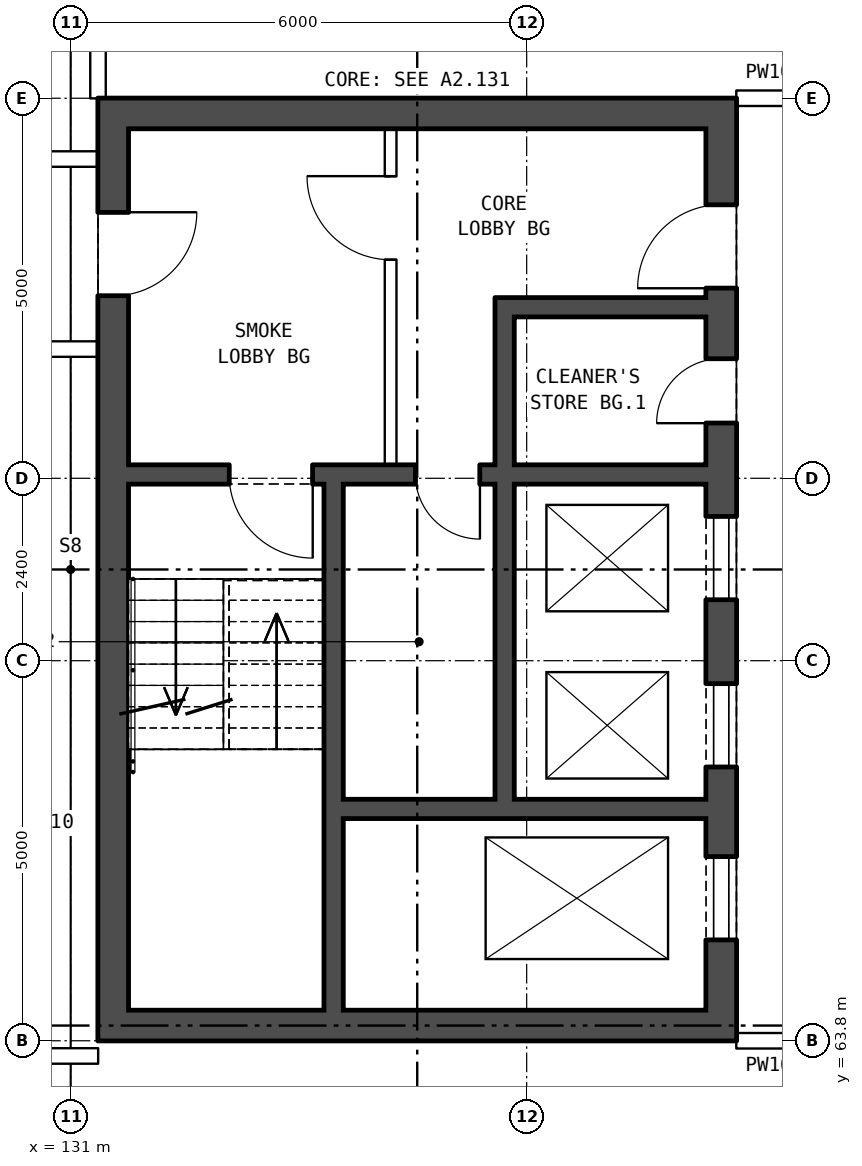
"""IFC4 building model, lengths in metres.
Left out: names, types, materials, properties, quantities, classifications, styles, units other than length and angle.
Written with IfcOpenShell. Run it as: python <this file> out.ifc"""

import sys

from ifc_helpers import new_model, si_unit, direction, frame, frame_2d, origin, place, context, subcontext, project, spatial, rectangle, extrude, element, fill, save


model = new_model("IFC4")
c1 = context("Model", 3, precision=1e-05, world=origin(), true_north=direction((0.0, 1.0)))
c2 = subcontext(c1, "Body", "Model", "MODEL_VIEW")
j1 = project(units=[si_unit("LENGTHUNIT", "METRE"), si_unit("PLANEANGLEUNIT", "RADIAN")], contexts=[c1])
p1 = place(None, origin())
s1 = spatial("IfcSite", under=j1, at=p1, CompositionType="ELEMENT")
p2 = place(p1, origin())
s2 = spatial("IfcBuilding", under=s1, at=p2, CompositionType="ELEMENT")
p3 = place(p2, frame((0.0, 0.0, 215.2)))
s3 = spatial("IfcBuildingStorey", under=s2, at=p3, CompositionType="ELEMENT", Elevation=215.2)
p4 = place(p3, frame((139.56, 63.8, 0.0), z_axis=(0.0, 0.0, 1.0), x_axis=(0.0, 1.0, 0.0)))
e1 = element("IfcWall", 1, at=p4, inside=s3, PredefinedType="SHEAR", context=c2, shape_type="SweptSolid", body=[
    extrude(rectangle(XDim=12.4, YDim=0.4, at=frame_2d((6.2, 0.0))), origin(), (0.0, 0.0, 1.0), 5.6),
])
p5 = place(p4, frame((1.325, 0.0, 0.0)))
e2 = element("IfcOpeningElement", 2, at=p5, cuts=e1, PredefinedType="OPENING", context=c2, shape_type="SweptSolid", body=[
    extrude(rectangle(XDim=1.1, YDim=2.1, at=frame_2d((0.55, 1.05))), frame((0.0, 0.21, 0.0), z_axis=(0.0, -1.0, 0.0), x_axis=(1.0, 0.0, 0.0)), (0.0, 0.0, 1.0), 0.42),
])
p6 = place(p4, frame((3.6, 0.0, 0.0)))
e3 = element("IfcOpeningElement", 3, at=p6, cuts=e1, PredefinedType="OPENING", context=c2, shape_type="SweptSolid", body=[
    extrude(rectangle(XDim=1.1, YDim=2.1, at=frame_2d((0.55, 1.05))), frame((0.0, 0.21, 0.0), z_axis=(0.0, -1.0, 0.0), x_axis=(1.0, 0.0, 0.0)), (0.0, 0.0, 1.0), 0.42),
])
p7 = place(p4, frame((5.8, 0.0, 0.0)))
e4 = element("IfcOpeningElement", 4, at=p7, cuts=e1, PredefinedType="OPENING", context=c2, shape_type="SweptSolid", body=[
    extrude(rectangle(XDim=1.1, YDim=2.1, at=frame_2d((0.55, 1.05))), frame((0.0, 0.21, 0.0), z_axis=(0.0, -1.0, 0.0), x_axis=(1.0, 0.0, 0.0)), (0.0, 0.0, 1.0), 0.42),
])
p8 = place(p4, frame((9.9, 0.0, 0.0)))
e5 = element("IfcOpeningElement", 5, at=p8, cuts=e1, PredefinedType="OPENING", context=c2, shape_type="SweptSolid", body=[
    extrude(rectangle(XDim=1.1, YDim=2.1, at=frame_2d((0.55, 1.05))), frame((0.0, 0.21, 0.0), z_axis=(0.0, -1.0, 0.0), x_axis=(1.0, 0.0, 0.0)), (0.0, 0.0, 1.0), 0.42),
])
p9 = place(p4, frame((8.125, 0.0, 0.0)))
e6 = element("IfcOpeningElement", 6, at=p9, cuts=e1, PredefinedType="OPENING", context=c2, shape_type="SweptSolid", body=[
    extrude(rectangle(XDim=0.85, YDim=2.1, at=frame_2d((0.425, 1.05))), frame((0.0, 0.21, 0.0), z_axis=(0.0, -1.0, 0.0), x_axis=(1.0, 0.0, 0.0)), (0.0, 0.0, 1.0), 0.42),
])
p10 = place(p3, frame((131.56, 63.8, 0.0), z_axis=(0.0, 0.0, 1.0), x_axis=(0.0, 1.0, 0.0)))
e7 = element("IfcWall", 7, at=p10, inside=s3, PredefinedType="SHEAR", context=c2, shape_type="SweptSolid", body=[
    extrude(rectangle(XDim=12.4, YDim=0.4, at=frame_2d((6.2, 0.0))), origin(), (0.0, 0.0, 1.0), 5.6),
])
p11 = place(p10, frame((9.8, 0.0, 0.0)))
e8 = element("IfcOpeningElement", 8, at=p11, cuts=e7, PredefinedType="OPENING", context=c2, shape_type="SweptSolid", body=[
    extrude(rectangle(XDim=1.1, YDim=2.1, at=frame_2d((0.55, 1.05))), frame((0.0, 0.21, 0.0), z_axis=(0.0, -1.0, 0.0), x_axis=(1.0, 0.0, 0.0)), (0.0, 0.0, 1.0), 0.42),
])
for number, where, z_axis, x_axis in (
    (9, (139.36, 64.0, 0.0), (0.0, 0.0, 1.0), (-1.0, 0.0, 0.0)),
    (10, (139.36, 76.0, 0.0), (0.0, 0.0, 1.0), (-1.0, 0.0, 0.0)),
):
    element("IfcWall", number, at=place(p3, frame(where, z_axis=z_axis, x_axis=x_axis)), inside=s3, PredefinedType="SHEAR", context=c2, shape_type="SweptSolid", body=[
        extrude(rectangle(XDim=7.6, YDim=0.4, at=frame_2d((3.8, 0.0))), origin(), (0.0, 0.0, 1.0), 5.6),
    ])
p12 = place(p3, frame((139.36, 66.85, 0.0), z_axis=(0.0, 0.0, 1.0), x_axis=(-1.0, 0.0, 0.0)))
e11 = element("IfcWall", 11, at=p12, inside=s3, PredefinedType="SHEAR", context=c2, shape_type="SweptSolid", body=[
    extrude(rectangle(XDim=4.775, YDim=0.25, at=frame_2d((2.388, 0.0))), origin(), (0.0, 0.0, 1.0), 5.6),
])
p13 = place(p3, frame((139.36, 71.25, 0.0), z_axis=(0.0, 0.0, 1.0), x_axis=(-1.0, 0.0, 0.0)))
e12 = element("IfcWall", 12, at=p13, inside=s3, PredefinedType="SHEAR", context=c2, shape_type="SweptSolid", body=[
    extrude(rectangle(XDim=7.6, YDim=0.25, at=frame_2d((3.8, 0.0))), origin(), (0.0, 0.0, 1.0), 5.6),
])
p14 = place(p13, frame((5.175, 0.0, 0.0)))
e13 = element("IfcOpeningElement", 13, at=p14, cuts=e12, PredefinedType="OPENING", context=c2, shape_type="SweptSolid", body=[
    extrude(rectangle(XDim=1.1, YDim=2.1, at=frame_2d((0.55, 1.05))), frame((0.0, 0.135, 0.0), z_axis=(0.0, -1.0, 0.0), x_axis=(1.0, 0.0, 0.0)), (0.0, 0.0, 1.0), 0.27),
])
p15 = place(p13, frame((2.975, 0.0, 0.0)))
e14 = element("IfcOpeningElement", 14, at=p15, cuts=e12, PredefinedType="OPENING", context=c2, shape_type="SweptSolid", body=[
    extrude(rectangle(XDim=0.85, YDim=2.1, at=frame_2d((0.425, 1.05))), frame((0.0, 0.135, 0.0), z_axis=(0.0, -1.0, 0.0), x_axis=(1.0, 0.0, 0.0)), (0.0, 0.0, 1.0), 0.27),
])
p16 = place(p3, frame((139.36, 73.45, 0.0), z_axis=(0.0, 0.0, 1.0), x_axis=(-1.0, 0.0, 0.0)))
e15 = element("IfcWall", 15, at=p16, inside=s3, PredefinedType="SHEAR", context=c2, shape_type="SweptSolid", body=[
    extrude(rectangle(XDim=2.525, YDim=0.25, at=frame_2d((1.263, 0.0))), origin(), (0.0, 0.0, 1.0), 5.6),
])
p17 = place(p3, frame((136.71, 66.975, 0.0), z_axis=(0.0, 0.0, 1.0), x_axis=(0.0, 1.0, 0.0)))
e16 = element("IfcWall", 16, at=p17, inside=s3, PredefinedType="SHEAR", context=c2, shape_type="SweptSolid", body=[
    extrude(rectangle(XDim=4.15, YDim=0.25, at=frame_2d((2.075, 0.0))), origin(), (0.0, 0.0, 1.0), 5.6),
])
p18 = place(p3, frame((136.71, 71.375, 0.0), z_axis=(0.0, 0.0, 1.0), x_axis=(0.0, 1.0, 0.0)))
e17 = element("IfcWall", 17, at=p18, inside=s3, PredefinedType="SHEAR", context=c2, shape_type="SweptSolid", body=[
    extrude(rectangle(XDim=2.2, YDim=0.25, at=frame_2d((1.1, 0.0))), origin(), (0.0, 0.0, 1.0), 5.6),
])
p19 = place(p3, frame((135.21, 71.375, 0.0), z_axis=(0.0, 0.0, 1.0), x_axis=(0.0, 1.0, 0.0)))
e18 = element("IfcWall", 18, at=p19, inside=s3, PredefinedType="PARTITIONING", context=c2, shape_type="SweptSolid", body=[
    extrude(rectangle(XDim=4.425, YDim=0.15, at=frame_2d((2.212, 0.0))), origin(), (0.0, 0.0, 1.0), 5.6),
])
p20 = place(p19, frame((2.7, 0.0, 0.0)))
e19 = element("IfcOpeningElement", 19, at=p20, cuts=e18, PredefinedType="OPENING", context=c2, shape_type="SweptSolid", body=[
    extrude(rectangle(XDim=1.1, YDim=2.1, at=frame_2d((0.55, 1.05))), frame((0.0, 0.085, 0.0), z_axis=(0.0, -1.0, 0.0), x_axis=(1.0, 0.0, 0.0)), (0.0, 0.0, 1.0), 0.17),
])
p21 = place(p3, frame((134.46, 64.2, 0.0), z_axis=(0.0, 0.0, 1.0), x_axis=(0.0, 1.0, 0.0)))
e20 = element("IfcWall", 20, at=p21, inside=s3, PredefinedType="SHEAR", context=c2, shape_type="SweptSolid", body=[
    extrude(rectangle(XDim=6.925, YDim=0.25, at=frame_2d((3.462, 0.0))), origin(), (0.0, 0.0, 1.0), 5.6),
])
p22 = place(p3, frame((101.2, 63.6, 0.0), z_axis=(0.0, 0.0, 1.0), x_axis=(1.0, 0.0, 0.0)))
e21 = element("IfcWall", 21, at=p22, inside=s3, PredefinedType="PARTITIONING", context=c2, shape_type="SweptSolid", body=[
    extrude(rectangle(XDim=30.16, YDim=0.2, at=frame_2d((15.08, 0.0))), origin(), (0.0, 0.0, 1.0), 5.6),
])
p23 = place(p3, frame((139.76, 63.8, 0.0), z_axis=(0.0, 0.0, 1.0), x_axis=(1.0, 0.0, 0.0)))
e22 = element("IfcWall", 22, at=p23, inside=s3, PredefinedType="PARTITIONING", context=c2, shape_type="SweptSolid", body=[
    extrude(rectangle(XDim=3.0, YDim=0.2, at=frame_2d((1.5, 0.0))), origin(), (0.0, 0.0, 1.0), 5.6),
])
p24 = place(p23, frame((1.0, 0.0, 0.0)))
e23 = element("IfcOpeningElement", 23, at=p24, cuts=e22, PredefinedType="OPENING", context=c2, shape_type="SweptSolid", body=[
    extrude(rectangle(XDim=1.0, YDim=2.1, at=frame_2d((0.5, 1.05))), frame((0.0, 0.11, 0.0), z_axis=(0.0, -1.0, 0.0), x_axis=(1.0, 0.0, 0.0)), (0.0, 0.0, 1.0), 0.22),
])
p25 = place(p3, frame((101.2, 72.9, 0.0), z_axis=(0.0, 0.0, 1.0), x_axis=(1.0, 0.0, 0.0)))
e24 = element("IfcWall", 24, at=p25, inside=s3, PredefinedType="PARTITIONING", context=c2, shape_type="SweptSolid", body=[
    extrude(rectangle(XDim=30.16, YDim=0.2, at=frame_2d((15.08, 0.0))), origin(), (0.0, 0.0, 1.0), 5.6),
])
p26 = place(p25, frame((15.55, 0.0, 0.0)))
e25 = element("IfcOpeningElement", 25, at=p26, cuts=e24, PredefinedType="OPENING", context=c2, shape_type="SweptSolid", body=[
    extrude(rectangle(XDim=1.0, YDim=2.1, at=frame_2d((0.5, 1.05))), frame((0.0, 0.11, 0.0), z_axis=(0.0, -1.0, 0.0), x_axis=(1.0, 0.0, 0.0)), (0.0, 0.0, 1.0), 0.22),
])
p27 = place(p25, frame((25.643, 0.0, 0.0)))
e26 = element("IfcOpeningElement", 26, at=p27, cuts=e24, PredefinedType="OPENING", context=c2, shape_type="SweptSolid", body=[
    extrude(rectangle(XDim=1.8, YDim=2.1, at=frame_2d((0.9, 1.05))), frame((0.0, 0.11, 0.0), z_axis=(0.0, -1.0, 0.0), x_axis=(1.0, 0.0, 0.0)), (0.0, 0.0, 1.0), 0.22),
])
p28 = place(p3, frame((75.64, 75.4, 0.0), z_axis=(0.0, 0.0, 1.0), x_axis=(1.0, 0.0, 0.0)))
e27 = element("IfcWall", 27, at=p28, inside=s3, PredefinedType="PARTITIONING", context=c2, shape_type="SweptSolid", body=[
    extrude(rectangle(XDim=55.72, YDim=0.2, at=frame_2d((27.86, 0.0))), origin(), (0.0, 0.0, 1.0), 5.6),
])
p29 = place(p28, frame((5.955, 0.0, 0.0)))
e28 = element("IfcOpeningElement", 28, at=p29, cuts=e27, PredefinedType="OPENING", context=c2, shape_type="SweptSolid", body=[
    extrude(rectangle(XDim=1.0, YDim=2.1, at=frame_2d((0.5, 1.05))), frame((0.0, 0.11, 0.0), z_axis=(0.0, -1.0, 0.0), x_axis=(1.0, 0.0, 0.0)), (0.0, 0.0, 1.0), 0.22),
])
p30 = place(p28, frame((17.048, 0.0, 0.0)))
e29 = element("IfcOpeningElement", 29, at=p30, cuts=e27, PredefinedType="OPENING", context=c2, shape_type="SweptSolid", body=[
    extrude(rectangle(XDim=1.0, YDim=2.1, at=frame_2d((0.5, 1.05))), frame((0.0, 0.11, 0.0), z_axis=(0.0, -1.0, 0.0), x_axis=(1.0, 0.0, 0.0)), (0.0, 0.0, 1.0), 0.22),
])
p31 = place(p28, frame((28.16, 0.0, 0.0)))
e30 = element("IfcOpeningElement", 30, at=p31, cuts=e27, PredefinedType="OPENING", context=c2, shape_type="SweptSolid", body=[
    extrude(rectangle(XDim=1.0, YDim=2.1, at=frame_2d((0.5, 1.05))), frame((0.0, 0.11, 0.0), z_axis=(0.0, -1.0, 0.0), x_axis=(1.0, 0.0, 0.0)), (0.0, 0.0, 1.0), 0.22),
])
p32 = place(p28, frame((37.672, 0.0, 0.0)))
e31 = element("IfcOpeningElement", 31, at=p32, cuts=e27, PredefinedType="OPENING", context=c2, shape_type="SweptSolid", body=[
    extrude(rectangle(XDim=1.0, YDim=2.1, at=frame_2d((0.5, 1.05))), frame((0.0, 0.11, 0.0), z_axis=(0.0, -1.0, 0.0), x_axis=(1.0, 0.0, 0.0)), (0.0, 0.0, 1.0), 0.22),
])
p33 = place(p28, frame((48.765, 0.0, 0.0)))
e32 = element("IfcOpeningElement", 32, at=p33, cuts=e27, PredefinedType="OPENING", context=c2, shape_type="SweptSolid", body=[
    extrude(rectangle(XDim=1.0, YDim=2.1, at=frame_2d((0.5, 1.05))), frame((0.0, 0.11, 0.0), z_axis=(0.0, -1.0, 0.0), x_axis=(1.0, 0.0, 0.0)), (0.0, 0.0, 1.0), 0.22),
])
p34 = place(p3, frame((139.76, 76.2, 0.0), z_axis=(0.0, 0.0, 1.0), x_axis=(1.0, 0.0, 0.0)))
e33 = element("IfcWall", 33, at=p34, inside=s3, PredefinedType="PARTITIONING", context=c2, shape_type="SweptSolid", body=[
    extrude(rectangle(XDim=3.0, YDim=0.2, at=frame_2d((1.5, 0.0))), origin(), (0.0, 0.0, 1.0), 5.6),
])
p35 = place(p34, frame((1.0, 0.0, 0.0)))
e34 = element("IfcOpeningElement", 34, at=p35, cuts=e33, PredefinedType="OPENING", context=c2, shape_type="SweptSolid", body=[
    extrude(rectangle(XDim=1.0, YDim=2.1, at=frame_2d((0.5, 1.05))), frame((0.0, 0.11, 0.0), z_axis=(0.0, -1.0, 0.0), x_axis=(1.0, 0.0, 0.0)), (0.0, 0.0, 1.0), 0.22),
])
p36 = place(p3, frame((131.36, 76.2, 0.0), z_axis=(0.0, 0.0, 1.0), x_axis=(0.0, 1.0, 0.0)))
e35 = element("IfcWall", 35, at=p36, inside=s3, PredefinedType="PARTITIONING", context=c2, shape_type="SweptSolid", body=[
    extrude(rectangle(XDim=3.1, YDim=0.2, at=frame_2d((1.55, 0.0))), origin(), (0.0, 0.0, 1.0), 5.6),
])
p37 = place(p5, origin())
e36 = element("IfcDoor", 36, at=p37, inside=s3, OperationType="DOUBLE_DOOR_SLIDING", PredefinedType="DOOR", context=c2, shape_type="SweptSolid", body=[
    extrude(rectangle(XDim=1.1, YDim=2.1, at=frame_2d((0.55, 1.05))), frame((0.0, 0.185, 0.0), z_axis=(0.0, -1.0, 0.0), x_axis=(1.0, 0.0, 0.0)), (0.0, 0.0, 1.0), 0.05),
])
fill(e2, e36)
p38 = place(p6, origin())
e37 = element("IfcDoor", 37, at=p38, inside=s3, OperationType="DOUBLE_DOOR_SLIDING", PredefinedType="DOOR", context=c2, shape_type="SweptSolid", body=[
    extrude(rectangle(XDim=1.1, YDim=2.1, at=frame_2d((0.55, 1.05))), frame((0.0, 0.185, 0.0), z_axis=(0.0, -1.0, 0.0), x_axis=(1.0, 0.0, 0.0)), (0.0, 0.0, 1.0), 0.05),
])
fill(e3, e37)
p39 = place(p7, origin())
e38 = element("IfcDoor", 38, at=p39, inside=s3, OperationType="DOUBLE_DOOR_SLIDING", PredefinedType="DOOR", context=c2, shape_type="SweptSolid", body=[
    extrude(rectangle(XDim=1.1, YDim=2.1, at=frame_2d((0.55, 1.05))), frame((0.0, 0.185, 0.0), z_axis=(0.0, -1.0, 0.0), x_axis=(1.0, 0.0, 0.0)), (0.0, 0.0, 1.0), 0.05),
])
fill(e4, e38)
p40 = place(p8, origin())
e39 = element("IfcDoor", 39, at=p40, inside=s3, OperationType="SINGLE_SWING_LEFT", PredefinedType="DOOR", context=c2, shape_type="SweptSolid", body=[
    extrude(rectangle(XDim=1.1, YDim=2.1, at=frame_2d((0.55, 1.05))), frame((0.0, 0.185, 0.0), z_axis=(0.0, -1.0, 0.0), x_axis=(1.0, 0.0, 0.0)), (0.0, 0.0, 1.0), 0.05),
])
fill(e5, e39)
p41 = place(p20, origin())
e40 = element("IfcDoor", 40, at=p41, inside=s3, OperationType="SINGLE_SWING_RIGHT", PredefinedType="DOOR", context=c2, shape_type="SweptSolid", body=[
    extrude(rectangle(XDim=1.1, YDim=2.1, at=frame_2d((0.55, 1.05))), frame((0.0, 0.025, 0.0), z_axis=(0.0, -1.0, 0.0), x_axis=(1.0, 0.0, 0.0)), (0.0, 0.0, 1.0), 0.05),
])
fill(e19, e40)
p42 = place(p14, origin())
e41 = element("IfcDoor", 41, at=p42, inside=s3, OperationType="SINGLE_SWING_LEFT", PredefinedType="DOOR", context=c2, shape_type="SweptSolid", body=[
    extrude(rectangle(XDim=1.1, YDim=2.1, at=frame_2d((0.55, 1.05))), frame((0.0, 0.025, 0.0), z_axis=(0.0, -1.0, 0.0), x_axis=(1.0, 0.0, 0.0)), (0.0, 0.0, 1.0), 0.05),
])
fill(e13, e41)
p43 = place(p9, origin())
e42 = element("IfcDoor", 42, at=p43, inside=s3, OperationType="SINGLE_SWING_LEFT", PredefinedType="DOOR", context=c2, shape_type="SweptSolid", body=[
    extrude(rectangle(XDim=0.85, YDim=2.1, at=frame_2d((0.425, 1.05))), frame((0.0, 0.185, 0.0), z_axis=(0.0, -1.0, 0.0), x_axis=(1.0, 0.0, 0.0)), (0.0, 0.0, 1.0), 0.05),
])
fill(e6, e42)
p44 = place(p15, origin())
e43 = element("IfcDoor", 43, at=p44, inside=s3, OperationType="SINGLE_SWING_LEFT", PredefinedType="DOOR", context=c2, shape_type="SweptSolid", body=[
    extrude(rectangle(XDim=0.85, YDim=2.1, at=frame_2d((0.425, 1.05))), frame((0.0, 0.025, 0.0), z_axis=(0.0, -1.0, 0.0), x_axis=(1.0, 0.0, 0.0)), (0.0, 0.0, 1.0), 0.05),
])
fill(e14, e43)
p45 = place(p11, frame((1.1, 0.0, 0.0), z_axis=(0.0, 0.0, 1.0), x_axis=(-1.0, 0.0, 0.0)))
e44 = element("IfcDoor", 44, at=p45, inside=s3, OperationType="SINGLE_SWING_LEFT", PredefinedType="DOOR", context=c2, shape_type="SweptSolid", body=[
    extrude(rectangle(XDim=1.1, YDim=2.1, at=frame_2d((0.55, 1.05))), frame((0.0, 0.185, 0.0), z_axis=(0.0, -1.0, 0.0), x_axis=(1.0, 0.0, 0.0)), (0.0, 0.0, 1.0), 0.05),
])
fill(e8, e44)
save(model, sys.argv[1])
